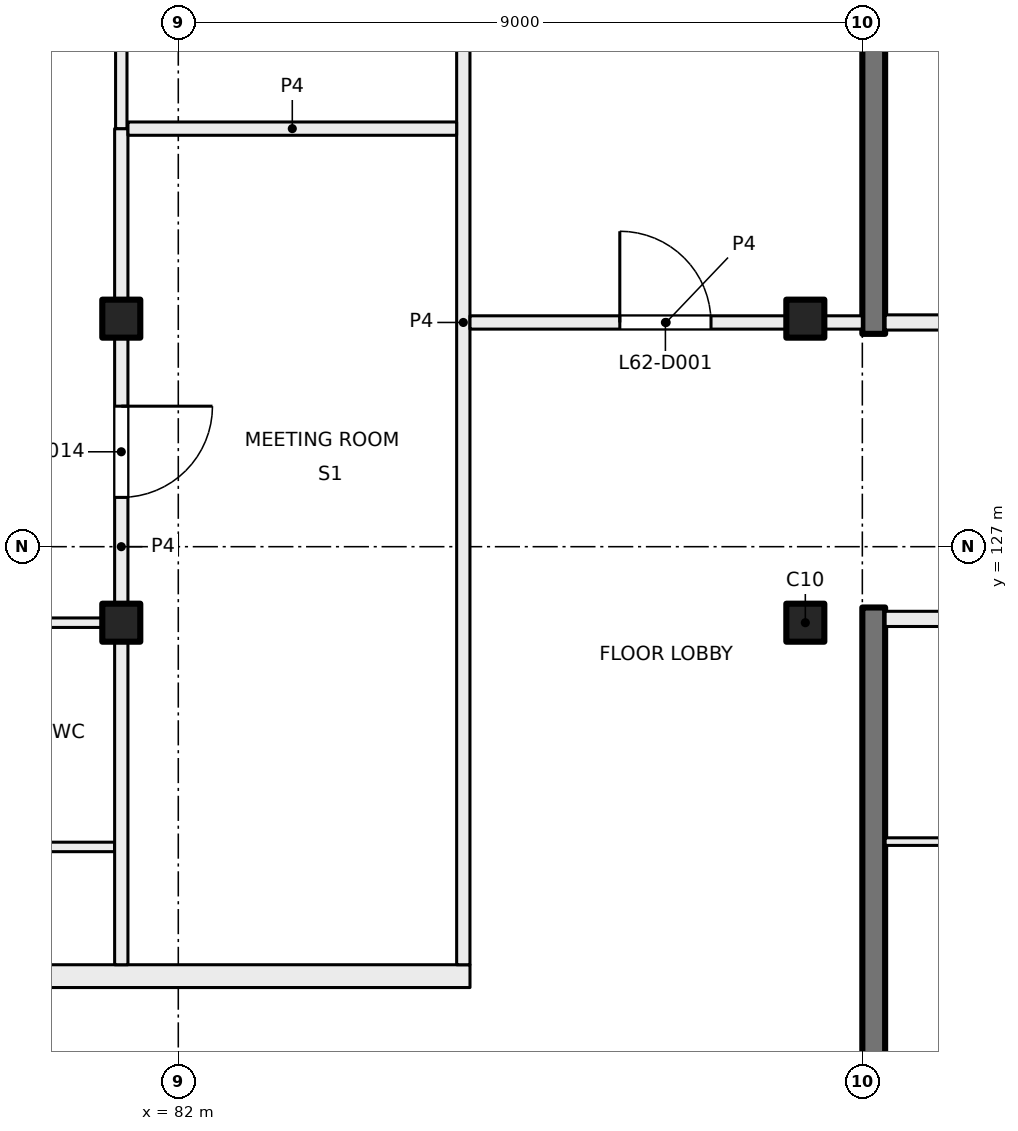
"""IFC4 building model, lengths in metres.
Left out: names, types, materials, properties, quantities, classifications, styles, units other than length and angle.
Written with IfcOpenShell. Run it as: python <this file> out.ifc"""

import sys

from ifc_helpers import new_model, si_unit, direction, frame, frame_2d, origin, origin_2d, place, context, subcontext, project, spatial, rectangle, extrude, element, fill, save


model = new_model("IFC4")
c1 = context("Model", 3, precision=1e-05, world=origin(), true_north=direction((0.0, 1.0)))
c2 = subcontext(c1, "Body", "Model", "MODEL_VIEW")
j1 = project(units=[si_unit("LENGTHUNIT", "METRE"), si_unit("PLANEANGLEUNIT", "RADIAN")], contexts=[c1])
p1 = place(None, origin())
s1 = spatial("IfcSite", under=j1, at=p1, CompositionType="ELEMENT")
p2 = place(p1, origin())
s2 = spatial("IfcBuilding", under=s1, at=p2, CompositionType="ELEMENT")
p3 = place(p2, frame((0.0, 0.0, 261.5)))
s3 = spatial("IfcBuildingStorey", under=s2, at=p3, CompositionType="ELEMENT", Elevation=261.5)
for number, where, z_axis, x_axis in (
    (1, (81.25, 130.0, 0.0), (0.0, 0.0, 1.0), (1.0, 0.0, 0.0)),
    (2, (90.25, 130.0, 0.0), (0.0, 0.0, 1.0), (1.0, 0.0, 0.0)),
    (3, (81.25, 126.0, 0.0), (0.0, 0.0, 1.0), (1.0, 0.0, 0.0)),
    (4, (90.25, 126.0, 0.0), (0.0, 0.0, 1.0), (1.0, 0.0, 0.0)),
):
    element("IfcColumn", number, at=place(p3, frame(where, z_axis=z_axis, x_axis=x_axis)), inside=s3, PredefinedType="COLUMN", context=c2, shape_type="SweptSolid", body=[
        extrude(rectangle(XDim=0.5, YDim=0.5, at=origin_2d()), origin(), (0.0, 0.0, 1.0), 4.0),
    ])
for number, where, z_axis, x_axis in (
    (5, (91.15, 138.55, 0.0), (0.0, 0.0, 1.0), (0.0, -1.0, 0.0)),
    (6, (91.15, 126.2, 0.0), (0.0, 0.0, 1.0), (0.0, -1.0, 0.0)),
):
    element("IfcWall", number, at=place(p3, frame(where, z_axis=z_axis, x_axis=x_axis)), inside=s3, PredefinedType="SHEAR", context=c2, shape_type="SweptSolid", body=[
        extrude(rectangle(XDim=8.75, YDim=0.3, at=frame_2d((4.375, 0.0))), origin(), (0.0, 0.0, 1.0), 4.0),
    ])
p4 = place(p3, frame((95.25, 126.05, 0.0), z_axis=(0.0, 0.0, 1.0), x_axis=(-1.0, 0.0, 0.0)))
e7 = element("IfcWall", 7, at=p4, inside=s3, PredefinedType="PARTITIONING", context=c2, shape_type="SweptSolid", body=[
    extrude(rectangle(XDim=3.95, YDim=0.2, at=frame_2d((1.975, 0.0))), origin(), (0.0, 0.0, 1.0), 3.625),
])
p5 = place(p4, frame((0.3, 0.0, 0.0)))
e8 = element("IfcOpeningElement", 8, at=p5, cuts=e7, PredefinedType="OPENING", context=c2, shape_type="SweptSolid", body=[
    extrude(rectangle(XDim=1.2, YDim=2.1, at=frame_2d((0.6, 1.05))), frame((0.0, 0.11, 0.0), z_axis=(0.0, -1.0, 0.0), x_axis=(1.0, 0.0, 0.0)), (0.0, 0.0, 1.0), 0.22),
])
p6 = place(p3, frame((93.4, 123.12, 0.0), z_axis=(0.0, 0.0, 1.0), x_axis=(-1.0, 0.0, 0.0)))
e9 = element("IfcWall", 9, at=p6, inside=s3, PredefinedType="PARTITIONING", context=c2, shape_type="SweptSolid", body=[
    extrude(rectangle(XDim=2.1, YDim=0.1, at=frame_2d((1.05, 0.0))), origin(), (0.0, 0.0, 1.0), 3.625),
])
p7 = place(p3, frame((91.3, 129.95, 0.0), z_axis=(0.0, 0.0, 1.0), x_axis=(1.0, 0.0, 0.0)))
e10 = element("IfcWall", 10, at=p7, inside=s3, PredefinedType="PARTITIONING", context=c2, shape_type="SweptSolid", body=[
    extrude(rectangle(XDim=3.95, YDim=0.2, at=frame_2d((1.975, 0.0))), origin(), (0.0, 0.0, 1.0), 3.625),
])
p8 = place(p7, frame((2.45, 0.0, 0.0)))
e11 = element("IfcOpeningElement", 11, at=p8, cuts=e10, PredefinedType="OPENING", context=c2, shape_type="SweptSolid", body=[
    extrude(rectangle(XDim=1.2, YDim=2.1, at=frame_2d((0.6, 1.05))), frame((0.0, 0.11, 0.0), z_axis=(0.0, -1.0, 0.0), x_axis=(1.0, 0.0, 0.0)), (0.0, 0.0, 1.0), 0.22),
])
p9 = place(p3, frame((54.4, 121.35, 0.0), z_axis=(0.0, 0.0, 1.0), x_axis=(1.0, 0.0, 0.0)))
e12 = element("IfcWall", 12, at=p9, inside=s3, PredefinedType="PARTITIONING", context=c2, shape_type="SweptSolid", body=[
    extrude(rectangle(XDim=31.438, YDim=0.3, at=frame_2d((15.719, 0.0))), origin(), (0.0, 0.0, 1.0), 3.625),
])
p10 = place(p9, frame((21.85, 0.0, 0.0)))
e13 = element("IfcOpeningElement", 13, at=p10, cuts=e12, PredefinedType="OPENING", context=c2, shape_type="SweptSolid", body=[
    extrude(rectangle(XDim=1.0, YDim=2.1, at=frame_2d((0.5, 1.05))), frame((0.0, 0.16, 0.0), z_axis=(0.0, -1.0, 0.0), x_axis=(1.0, 0.0, 0.0)), (0.0, 0.0, 1.0), 0.32),
])
p11 = place(p9, frame((12.75, 0.0, 0.0)))
e14 = element("IfcOpeningElement", 14, at=p11, cuts=e12, PredefinedType="OPENING", context=c2, shape_type="SweptSolid", body=[
    extrude(rectangle(XDim=1.2, YDim=2.1, at=frame_2d((0.6, 1.05))), frame((0.0, 0.16, 0.0), z_axis=(0.0, -1.0, 0.0), x_axis=(1.0, 0.0, 0.0)), (0.0, 0.0, 1.0), 0.32),
])
p12 = place(p9, frame((3.515, 0.0, 0.0)))
e15 = element("IfcOpeningElement", 15, at=p12, cuts=e12, PredefinedType="OPENING", context=c2, shape_type="SweptSolid", body=[
    extrude(rectangle(XDim=1.8, YDim=2.1, at=frame_2d((0.9, 1.05))), frame((0.0, 0.16, 0.0), z_axis=(0.0, -1.0, 0.0), x_axis=(1.0, 0.0, 0.0)), (0.0, 0.0, 1.0), 0.32),
])
p13 = place(p3, frame((72.338, 123.05, 0.0), z_axis=(0.0, 0.0, 1.0), x_axis=(1.0, 0.0, 0.0)))
e16 = element("IfcWall", 16, at=p13, inside=s3, PredefinedType="PARTITIONING", context=c2, shape_type="SweptSolid", body=[
    extrude(rectangle(XDim=8.824, YDim=0.125, at=frame_2d((4.412, 0.0))), origin(), (0.0, 0.0, 1.0), 3.625),
])
p14 = place(p13, frame((6.778, 0.0, 0.0)))
e17 = element("IfcOpeningElement", 17, at=p14, cuts=e16, PredefinedType="OPENING", context=c2, shape_type="SweptSolid", body=[
    extrude(rectangle(XDim=0.8, YDim=2.1, at=frame_2d((0.4, 1.05))), frame((0.0, 0.073, 0.0), z_axis=(0.0, -1.0, 0.0), x_axis=(1.0, 0.0, 0.0)), (0.0, 0.0, 1.0), 0.145),
])
p15 = place(p13, frame((3.612, 0.0, 0.0)))
e18 = element("IfcOpeningElement", 18, at=p15, cuts=e16, PredefinedType="OPENING", context=c2, shape_type="SweptSolid", body=[
    extrude(rectangle(XDim=0.8, YDim=2.1, at=frame_2d((0.4, 1.05))), frame((0.0, 0.073, 0.0), z_axis=(0.0, -1.0, 0.0), x_axis=(1.0, 0.0, 0.0)), (0.0, 0.0, 1.0), 0.145),
])
p16 = place(p13, frame((0.746, 0.0, 0.0)))
e19 = element("IfcOpeningElement", 19, at=p16, cuts=e16, PredefinedType="OPENING", context=c2, shape_type="SweptSolid", body=[
    extrude(rectangle(XDim=1.0, YDim=2.1, at=frame_2d((0.5, 1.05))), frame((0.0, 0.073, 0.0), z_axis=(0.0, -1.0, 0.0), x_axis=(1.0, 0.0, 0.0)), (0.0, 0.0, 1.0), 0.145),
])
p17 = place(p3, frame((72.25, 126.0, 0.0), z_axis=(0.0, 0.0, 1.0), x_axis=(1.0, 0.0, 0.0)))
e20 = element("IfcWall", 20, at=p17, inside=s3, PredefinedType="PARTITIONING", context=c2, shape_type="SweptSolid", body=[
    extrude(rectangle(XDim=8.912, YDim=0.125, at=frame_2d((4.456, 0.0))), origin(), (0.0, 0.0, 1.0), 3.625),
])
p18 = place(p3, frame((81.25, 132.5, 0.0), z_axis=(0.0, 0.0, 1.0), x_axis=(0.0, -1.0, 0.0)))
e21 = element("IfcWall", 21, at=p18, inside=s3, PredefinedType="PARTITIONING", context=c2, shape_type="SweptSolid", body=[
    extrude(rectangle(XDim=11.0, YDim=0.175, at=frame_2d((5.5, 0.0))), origin(), (0.0, 0.0, 1.0), 3.625),
])
p19 = place(p18, frame((3.652, 0.0, 0.0)))
e22 = element("IfcOpeningElement", 22, at=p19, cuts=e21, PredefinedType="OPENING", context=c2, shape_type="SweptSolid", body=[
    extrude(rectangle(XDim=1.2, YDim=2.1, at=frame_2d((0.6, 1.05))), frame((0.0, 0.097, 0.0), z_axis=(0.0, -1.0, 0.0), x_axis=(1.0, 0.0, 0.0)), (0.0, 0.0, 1.0), 0.195),
])
p20 = place(p3, frame((81.25, 132.5, 0.0), z_axis=(0.0, 0.0, 1.0), x_axis=(0.0, 1.0, 0.0)))
e23 = element("IfcWall", 23, at=p20, inside=s3, PredefinedType="PARTITIONING", context=c2, shape_type="SweptSolid", body=[
    extrude(rectangle(XDim=5.9, YDim=0.15, at=frame_2d((2.95, 0.0))), origin(), (0.0, 0.0, 1.0), 3.625),
])
p21 = place(p20, frame((2.45, 0.0, 0.0)))
e24 = element("IfcOpeningElement", 24, at=p21, cuts=e23, PredefinedType="OPENING", context=c2, shape_type="SweptSolid", body=[
    extrude(rectangle(XDim=1.0, YDim=2.1, at=frame_2d((0.5, 1.05))), frame((0.0, 0.085, 0.0), z_axis=(0.0, -1.0, 0.0), x_axis=(1.0, 0.0, 0.0)), (0.0, 0.0, 1.0), 0.17),
])
p22 = place(p3, frame((85.75, 121.5, 0.0), z_axis=(0.0, 0.0, 1.0), x_axis=(0.0, 1.0, 0.0)))
e25 = element("IfcWall", 25, at=p22, inside=s3, PredefinedType="PARTITIONING", context=c2, shape_type="SweptSolid", body=[
    extrude(rectangle(XDim=16.9, YDim=0.175, at=frame_2d((8.45, 0.0))), origin(), (0.0, 0.0, 1.0), 3.625),
])
p23 = place(p3, frame((85.662, 132.5, 0.0), z_axis=(0.0, 0.0, 1.0), x_axis=(-1.0, 0.0, 0.0)))
e26 = element("IfcWall", 26, at=p23, inside=s3, PredefinedType="PARTITIONING", context=c2, shape_type="SweptSolid", body=[
    extrude(rectangle(XDim=4.324, YDim=0.175, at=frame_2d((2.162, 0.0))), origin(), (0.0, 0.0, 1.0), 3.625),
])
p24 = place(p3, frame((85.838, 129.95, 0.0), z_axis=(0.0, 0.0, 1.0), x_axis=(1.0, 0.0, 0.0)))
e27 = element("IfcWall", 27, at=p24, inside=s3, PredefinedType="PARTITIONING", context=c2, shape_type="SweptSolid", body=[
    extrude(rectangle(XDim=5.162, YDim=0.175, at=frame_2d((2.581, 0.0))), origin(), (0.0, 0.0, 1.0), 3.625),
])
p25 = place(p24, frame((1.971, 0.0, 0.0)))
e28 = element("IfcOpeningElement", 28, at=p25, cuts=e27, PredefinedType="OPENING", context=c2, shape_type="SweptSolid", body=[
    extrude(rectangle(XDim=1.2, YDim=2.1, at=frame_2d((0.6, 1.05))), frame((0.0, 0.097, 0.0), z_axis=(0.0, -1.0, 0.0), x_axis=(1.0, 0.0, 0.0)), (0.0, 0.0, 1.0), 0.195),
])
p26 = place(p25, origin())
e29 = element("IfcDoor", 29, at=p26, inside=s3, OperationType="DOUBLE_DOOR_SINGLE_SWING", PredefinedType="DOOR", context=c2, shape_type="SweptSolid", body=[
    extrude(rectangle(XDim=1.2, YDim=2.1, at=frame_2d((0.6, 1.05))), frame((0.0, 0.025, 0.0), z_axis=(0.0, -1.0, 0.0), x_axis=(1.0, 0.0, 0.0)), (0.0, 0.0, 1.0), 0.05),
])
fill(e28, e29)
p27 = place(p19, origin())
e30 = element("IfcDoor", 30, at=p27, inside=s3, OperationType="DOUBLE_DOOR_SINGLE_SWING", PredefinedType="DOOR", context=c2, shape_type="SweptSolid", body=[
    extrude(rectangle(XDim=1.2, YDim=2.1, at=frame_2d((0.6, 1.05))), frame((0.0, 0.025, 0.0), z_axis=(0.0, -1.0, 0.0), x_axis=(1.0, 0.0, 0.0)), (0.0, 0.0, 1.0), 0.05),
])
fill(e22, e30)
save(model, sys.argv[1])
